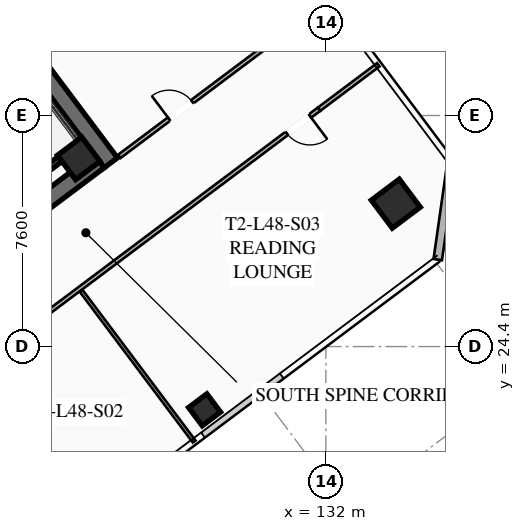
"""IFC4 building model, lengths in metres.
Left out: names, types, materials, properties, quantities, classifications, styles, units other than length and angle.
Written with IfcOpenShell. Run it as: python <this file> out.ifc"""

import sys

from ifc_helpers import new_model, si_unit, direction, frame, frame_2d, origin, origin_2d, place, context, subcontext, project, spatial, rectangle, hollow_rectangle, extrude, element, fill, save


model = new_model("IFC4")
c1 = context("Model", 3, precision=1e-05, world=origin(), true_north=direction((0.0, 1.0)))
c2 = subcontext(c1, "Body", "Model", "MODEL_VIEW")
j1 = project(units=[si_unit("LENGTHUNIT", "METRE"), si_unit("PLANEANGLEUNIT", "RADIAN")], contexts=[c1])
p1 = place(None, origin())
s1 = spatial("IfcSite", under=j1, at=p1, CompositionType="ELEMENT")
p2 = place(p1, origin())
s2 = spatial("IfcBuilding", under=s1, at=p2, CompositionType="ELEMENT")
p3 = place(p2, frame((0.0, 0.0, 178.3)))
s3 = spatial("IfcBuildingStorey", under=s2, at=p3, CompositionType="ELEMENT", Elevation=178.3)
p4 = place(p3, frame((115.564, 42.923, 0.0), z_axis=(0.0, 0.0, 1.0), x_axis=(0.600005007985, -0.799996243986, 0.0)))
e1 = element("IfcWall", 1, at=p4, inside=s3, PredefinedType="SHEAR", context=c2, shape_type="SweptSolid", body=[
    extrude(rectangle(XDim=15.6, YDim=0.55, at=frame_2d((7.8, 0.0))), origin(), (0.0, 0.0, 1.0), 3.55),
])
p5 = place(p3, frame((124.539, 30.498, 0.0), z_axis=(0.0, 0.0, 1.0), x_axis=(-0.799998054672, -0.600002593761, 0.0)))
e2 = element("IfcWall", 2, at=p5, inside=s3, PredefinedType="SHEAR", context=c2, shape_type="SweptSolid", body=[
    extrude(rectangle(XDim=15.06, YDim=0.55, at=frame_2d((7.53, 0.0))), origin(), (0.0, 0.0, 1.0), 3.55),
])
p6 = place(p5, frame((9.23, 0.0, 0.0)))
e3 = element("IfcOpeningElement", 3, at=p6, cuts=e2, PredefinedType="OPENING", context=c2, shape_type="SweptSolid", body=[
    extrude(rectangle(XDim=1.25, YDim=2.25, at=frame_2d((0.625, 1.125))), frame((0.0, 0.285, 0.0), z_axis=(0.0, -1.0, 0.0), x_axis=(1.0, 0.0, 0.0)), (0.0, 0.0, 1.0), 0.57),
])
p7 = place(p5, frame((4.18, 0.0, 0.0)))
e4 = element("IfcOpeningElement", 4, at=p7, cuts=e2, PredefinedType="OPENING", context=c2, shape_type="SweptSolid", body=[
    extrude(rectangle(XDim=1.25, YDim=2.25, at=frame_2d((0.625, 1.125))), frame((0.0, 0.285, 0.0), z_axis=(0.0, -1.0, 0.0), x_axis=(1.0, 0.0, 0.0)), (0.0, 0.0, 1.0), 0.57),
])
p8 = place(p3, frame((123.87, 30.59, 0.0), z_axis=(0.0, 0.0, 1.0), x_axis=(0.799999996291, 0.600000004945, 0.0)))
e5 = element("IfcColumn", 5, at=p8, inside=s3, PredefinedType="COLUMN", context=c2, shape_type="SweptSolid", body=[
    extrude(hollow_rectangle(XDim=1.0, YDim=1.0, WallThickness=0.04, at=origin_2d()), origin(), (0.0, 0.0, 1.0), 3.37),
])
p9 = place(p3, frame((134.3, 29.1, 0.0), z_axis=(0.0, 0.0, 1.0), x_axis=(0.799999996291, 0.600000004945, 0.0)))
e6 = element("IfcColumn", 6, at=p9, inside=s3, PredefinedType="COLUMN", context=c2, shape_type="SweptSolid", body=[
    extrude(hollow_rectangle(XDim=1.15, YDim=1.15, WallThickness=0.045, at=origin_2d()), origin(), (0.0, 0.0, 1.0), 3.37),
])
p10 = place(p3, frame((128.01, 22.32, 0.0), z_axis=(0.0, 0.0, 1.0), x_axis=(0.799999996291, 0.600000004945, 0.0)))
e7 = element("IfcColumn", 7, at=p10, inside=s3, PredefinedType="COLUMN", context=c2, shape_type="SweptSolid", body=[
    extrude(hollow_rectangle(XDim=0.75, YDim=0.75, WallThickness=0.032, at=origin_2d()), origin(), (0.0, 0.0, 1.0), 3.37),
])
p11 = place(p3, frame((136.14, 30.48, 0.0), z_axis=(0.0, 0.0, 1.0), x_axis=(-0.141410847992, -0.989950994782, 0.0)))
e8 = element("IfcWall", 8, at=p11, inside=s3, PredefinedType="SOLIDWALL", context=c2, shape_type="SweptSolid", body=[
    extrude(rectangle(XDim=3.253, YDim=0.28, at=frame_2d((1.626, 0.0))), origin(), (0.0, 0.0, 1.0), 3.37),
])
p12 = place(p3, frame((120.98, 28.86, 0.0), z_axis=(0.0, 0.0, 1.0), x_axis=(0.800015298837, 0.599979601008, 0.0)))
e9 = element("IfcWall", 9, at=p12, inside=s3, PredefinedType="SHEAR", context=c2, shape_type="SweptSolid", body=[
    extrude(rectangle(XDim=3.83, YDim=0.2, at=frame_2d((1.915, 0.0))), origin(), (0.0, 0.0, 1.0), 3.37),
])
p13 = place(p3, frame((131.78, 32.21, 0.0), z_axis=(0.0, 0.0, 1.0), x_axis=(-0.8, -0.6, 0.0)))
e10 = element("IfcWall", 10, at=p13, inside=s3, PredefinedType="PARTITIONING", context=c2, shape_type="SweptSolid", body=[
    extrude(rectangle(XDim=28.7, YDim=0.135, at=frame_2d((14.35, 0.0))), origin(), (0.0, 0.0, 1.0), 2.723),
])
p14 = place(p13, frame((27.37, 0.0, 0.0)))
e11 = element("IfcOpeningElement", 11, at=p14, cuts=e10, PredefinedType="OPENING", context=c2, shape_type="SweptSolid", body=[
    extrude(rectangle(XDim=0.95, YDim=2.05, at=frame_2d((0.475, 1.025))), frame((0.0, 0.077, 0.0), z_axis=(0.0, -1.0, 0.0), x_axis=(1.0, 0.0, 0.0)), (0.0, 0.0, 1.0), 0.155),
])
p15 = place(p13, frame((13.592, 0.0, 0.0)))
e12 = element("IfcOpeningElement", 12, at=p15, cuts=e10, PredefinedType="OPENING", context=c2, shape_type="SweptSolid", body=[
    extrude(rectangle(XDim=0.95, YDim=2.05, at=frame_2d((0.475, 1.025))), frame((0.0, 0.077, 0.0), z_axis=(0.0, -1.0, 0.0), x_axis=(1.0, 0.0, 0.0)), (0.0, 0.0, 1.0), 0.155),
])
p16 = place(p13, frame((0.38, 0.0, 0.0)))
e13 = element("IfcOpeningElement", 13, at=p16, cuts=e10, PredefinedType="OPENING", context=c2, shape_type="SweptSolid", body=[
    extrude(rectangle(XDim=0.95, YDim=2.05, at=frame_2d((0.475, 1.025))), frame((0.0, 0.077, 0.0), z_axis=(0.0, -1.0, 0.0), x_axis=(1.0, 0.0, 0.0)), (0.0, 0.0, 1.0), 0.155),
])
p17 = place(p3, frame((131.78, 32.21, 0.0), z_axis=(0.0, 0.0, 1.0), x_axis=(0.800012055778, 0.599983925293, 0.0)))
e14 = element("IfcWall", 14, at=p17, inside=s3, PredefinedType="PARTITIONING", context=c2, shape_type="SweptSolid", body=[
    extrude(rectangle(XDim=2.43, YDim=0.135, at=frame_2d((1.215, 0.0))), origin(), (0.0, 0.0, 1.0), 2.723),
])
p18 = place(p3, frame((127.668, 21.276, 0.0), z_axis=(0.0, 0.0, 1.0), x_axis=(-0.599981099069, 0.800014175349, 0.0)))
e15 = element("IfcWall", 15, at=p18, inside=s3, PredefinedType="PARTITIONING", context=c2, shape_type="SweptSolid", body=[
    extrude(rectangle(XDim=6.2, YDim=0.11, at=frame_2d((3.1, 0.0))), origin(), (0.0, 0.0, 1.0), 2.723),
])
p19 = place(p3, frame((125.208, 30.656, 0.0), z_axis=(0.0, 0.0, 1.0), x_axis=(0.800006797429, 0.599990936654, 0.0)))
e16 = element("IfcWall", 16, at=p19, inside=s3, PredefinedType="PARTITIONING", context=c2, shape_type="SweptSolid", body=[
    extrude(rectangle(XDim=8.62, YDim=0.135, at=frame_2d((4.31, 0.0))), origin(), (0.0, 0.0, 1.0), 2.723),
])
p20 = place(p19, frame((2.045, 0.0, 0.0)))
e17 = element("IfcOpeningElement", 17, at=p20, cuts=e16, PredefinedType="OPENING", context=c2, shape_type="SweptSolid", body=[
    extrude(rectangle(XDim=0.95, YDim=2.05, at=frame_2d((0.475, 1.025))), frame((0.0, 0.077, 0.0), z_axis=(0.0, -1.0, 0.0), x_axis=(1.0, 0.0, 0.0)), (0.0, 0.0, 1.0), 0.155),
])
p21 = place(p16, origin())
e18 = element("IfcDoor", 18, at=p21, inside=s3, OperationType="SINGLE_SWING_LEFT", PredefinedType="DOOR", context=c2, shape_type="SweptSolid", body=[
    extrude(rectangle(XDim=0.95, YDim=2.05, at=frame_2d((0.475, 1.025))), frame((0.0, 0.025, 0.0), z_axis=(0.0, -1.0, 0.0), x_axis=(1.0, 0.0, 0.0)), (0.0, 0.0, 1.0), 0.05),
])
fill(e13, e18)
p22 = place(p20, origin())
e19 = element("IfcDoor", 19, at=p22, inside=s3, OperationType="SINGLE_SWING_LEFT", PredefinedType="DOOR", context=c2, shape_type="SweptSolid", body=[
    extrude(rectangle(XDim=0.95, YDim=2.05, at=frame_2d((0.475, 1.025))), frame((0.0, 0.025, 0.0), z_axis=(0.0, -1.0, 0.0), x_axis=(1.0, 0.0, 0.0)), (0.0, 0.0, 1.0), 0.05),
])
fill(e17, e19)
save(model, sys.argv[1])
